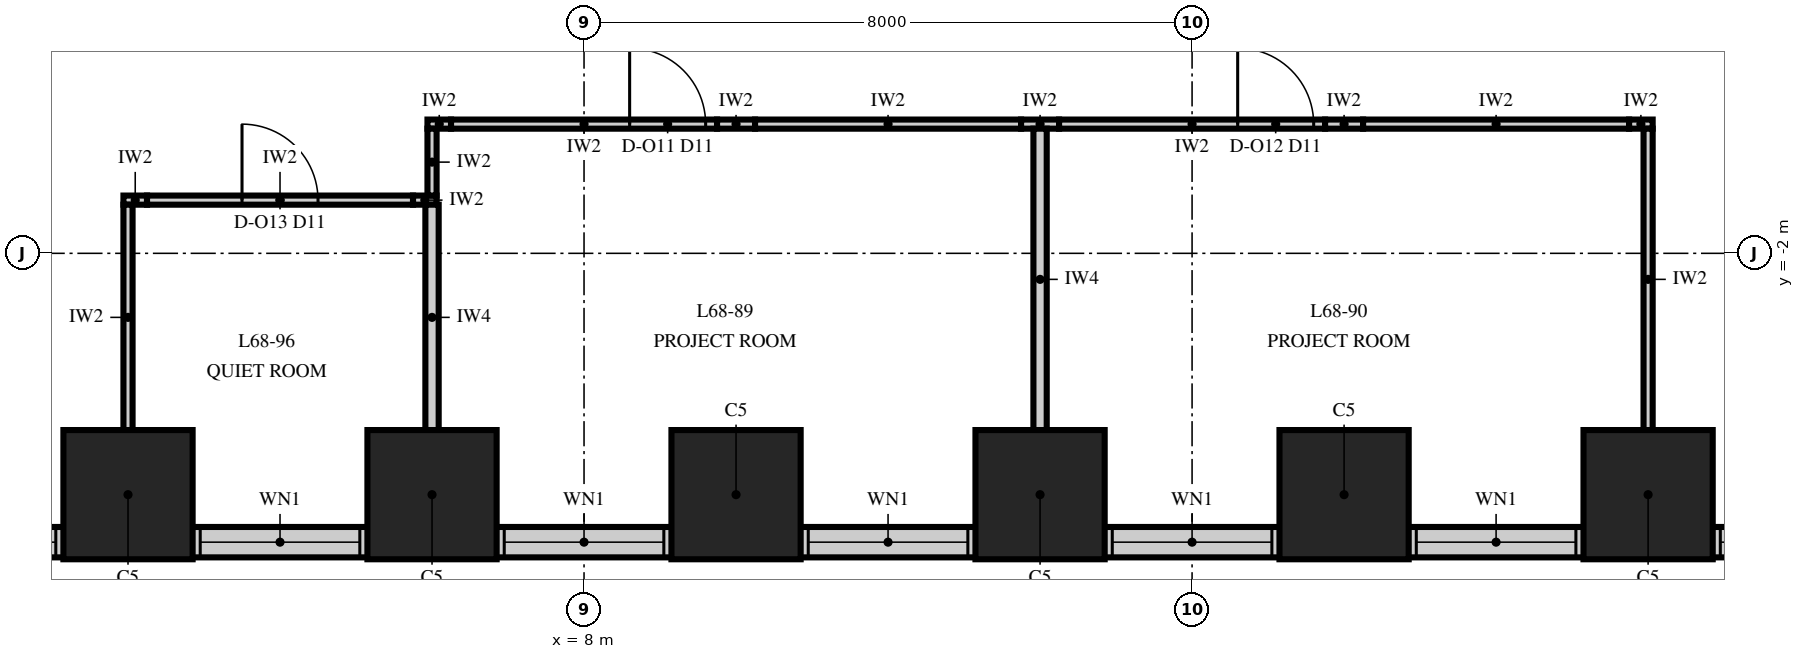
"""IFC4 building model, lengths in metres.
Left out: names, types, materials, properties, quantities, classifications, styles, units other than length and angle.
Written with IfcOpenShell. Run it as: python <this file> out.ifc"""

import sys

from ifc_helpers import new_model, si_unit, direction, frame, frame_2d, origin, origin_2d, place, context, subcontext, project, spatial, rectangle, extrude, element, fill, save


model = new_model("IFC4")
c1 = context("Model", 3, precision=1e-05, world=origin(), true_north=direction((0.0, 1.0)))
c2 = subcontext(c1, "Body", "Model", "MODEL_VIEW")
j1 = project(units=[si_unit("LENGTHUNIT", "METRE"), si_unit("PLANEANGLEUNIT", "RADIAN")], contexts=[c1])
p1 = place(None, origin())
s1 = spatial("IfcSite", under=j1, at=p1, CompositionType="ELEMENT")
p2 = place(p1, origin())
s2 = spatial("IfcBuilding", under=s1, at=p2, CompositionType="ELEMENT")
p3 = place(p2, frame((0.0, 0.0, 292.0)))
s3 = spatial("IfcBuildingStorey", under=s2, at=p3, CompositionType="ELEMENT", Elevation=292.0)
for number, where, z_axis, x_axis in (
    (1, (2.0, -5.175, 0.0), (0.0, 0.0, 1.0), (1.0, 0.0, 0.0)),
    (2, (6.0, -5.175, 0.0), (0.0, 0.0, 1.0), (1.0, 0.0, 0.0)),
    (3, (10.0, -5.175, 0.0), (0.0, 0.0, 1.0), (1.0, 0.0, 0.0)),
    (4, (14.0, -5.175, 0.0), (0.0, 0.0, 1.0), (1.0, 0.0, 0.0)),
    (5, (18.0, -5.175, 0.0), (0.0, 0.0, 1.0), (1.0, 0.0, 0.0)),
    (6, (22.0, -5.175, 0.0), (0.0, 0.0, 1.0), (1.0, 0.0, 0.0)),
):
    element("IfcColumn", number, at=place(p3, frame(where, z_axis=z_axis, x_axis=x_axis)), inside=s3, PredefinedType="COLUMN", context=c2, shape_type="SweptSolid", body=[
        extrude(rectangle(XDim=1.7, YDim=1.7, at=origin_2d()), origin(), (0.0, 0.0, 1.0), 3.75),
    ])
p4 = place(p3, frame((-26.0, -5.8, 0.0), z_axis=(0.0, 0.0, 1.0), x_axis=(1.0, 0.0, 0.0)))
e7 = element("IfcWall", 7, at=p4, inside=s3, PredefinedType="SOLIDWALL", context=c2, shape_type="SweptSolid", body=[
    extrude(rectangle(XDim=52.0, YDim=0.4, at=frame_2d((26.0, 0.0))), origin(), (0.0, 0.0, 1.0), 2.0),
])
p5 = place(p4, frame((0.95, 0.0, 0.8)))
e8 = element("IfcOpeningElement", 8, at=p5, cuts=e7, PredefinedType="OPENING", context=c2, shape_type="SweptSolid", body=[
    extrude(rectangle(XDim=2.1, YDim=1.15, at=frame_2d((1.05, 0.575))), frame((0.0, 0.215, 0.0), z_axis=(0.0, -1.0, 0.0), x_axis=(1.0, 0.0, 0.0)), (0.0, 0.0, 1.0), 0.43),
])
p6 = place(p4, frame((4.95, 0.0, 0.8)))
e9 = element("IfcOpeningElement", 9, at=p6, cuts=e7, PredefinedType="OPENING", context=c2, shape_type="SweptSolid", body=[
    extrude(rectangle(XDim=2.1, YDim=1.15, at=frame_2d((1.05, 0.575))), frame((0.0, 0.215, 0.0), z_axis=(0.0, -1.0, 0.0), x_axis=(1.0, 0.0, 0.0)), (0.0, 0.0, 1.0), 0.43),
])
p7 = place(p4, frame((8.95, 0.0, 0.8)))
e10 = element("IfcOpeningElement", 10, at=p7, cuts=e7, PredefinedType="OPENING", context=c2, shape_type="SweptSolid", body=[
    extrude(rectangle(XDim=2.1, YDim=1.15, at=frame_2d((1.05, 0.575))), frame((0.0, 0.215, 0.0), z_axis=(0.0, -1.0, 0.0), x_axis=(1.0, 0.0, 0.0)), (0.0, 0.0, 1.0), 0.43),
])
p8 = place(p4, frame((12.95, 0.0, 0.8)))
e11 = element("IfcOpeningElement", 11, at=p8, cuts=e7, PredefinedType="OPENING", context=c2, shape_type="SweptSolid", body=[
    extrude(rectangle(XDim=2.1, YDim=1.15, at=frame_2d((1.05, 0.575))), frame((0.0, 0.215, 0.0), z_axis=(0.0, -1.0, 0.0), x_axis=(1.0, 0.0, 0.0)), (0.0, 0.0, 1.0), 0.43),
])
p9 = place(p4, frame((16.95, 0.0, 0.8)))
e12 = element("IfcOpeningElement", 12, at=p9, cuts=e7, PredefinedType="OPENING", context=c2, shape_type="SweptSolid", body=[
    extrude(rectangle(XDim=2.1, YDim=1.15, at=frame_2d((1.05, 0.575))), frame((0.0, 0.215, 0.0), z_axis=(0.0, -1.0, 0.0), x_axis=(1.0, 0.0, 0.0)), (0.0, 0.0, 1.0), 0.43),
])
p10 = place(p4, frame((20.95, 0.0, 0.8)))
e13 = element("IfcOpeningElement", 13, at=p10, cuts=e7, PredefinedType="OPENING", context=c2, shape_type="SweptSolid", body=[
    extrude(rectangle(XDim=2.1, YDim=1.15, at=frame_2d((1.05, 0.575))), frame((0.0, 0.215, 0.0), z_axis=(0.0, -1.0, 0.0), x_axis=(1.0, 0.0, 0.0)), (0.0, 0.0, 1.0), 0.43),
])
p11 = place(p4, frame((24.95, 0.0, 0.8)))
e14 = element("IfcOpeningElement", 14, at=p11, cuts=e7, PredefinedType="OPENING", context=c2, shape_type="SweptSolid", body=[
    extrude(rectangle(XDim=2.1, YDim=1.15, at=frame_2d((1.05, 0.575))), frame((0.0, 0.215, 0.0), z_axis=(0.0, -1.0, 0.0), x_axis=(1.0, 0.0, 0.0)), (0.0, 0.0, 1.0), 0.43),
])
p12 = place(p4, frame((28.95, 0.0, 0.8)))
e15 = element("IfcOpeningElement", 15, at=p12, cuts=e7, PredefinedType="OPENING", context=c2, shape_type="SweptSolid", body=[
    extrude(rectangle(XDim=2.1, YDim=1.15, at=frame_2d((1.05, 0.575))), frame((0.0, 0.215, 0.0), z_axis=(0.0, -1.0, 0.0), x_axis=(1.0, 0.0, 0.0)), (0.0, 0.0, 1.0), 0.43),
])
p13 = place(p4, frame((32.95, 0.0, 0.8)))
e16 = element("IfcOpeningElement", 16, at=p13, cuts=e7, PredefinedType="OPENING", context=c2, shape_type="SweptSolid", body=[
    extrude(rectangle(XDim=2.1, YDim=1.15, at=frame_2d((1.05, 0.575))), frame((0.0, 0.215, 0.0), z_axis=(0.0, -1.0, 0.0), x_axis=(1.0, 0.0, 0.0)), (0.0, 0.0, 1.0), 0.43),
])
p14 = place(p4, frame((36.95, 0.0, 0.8)))
e17 = element("IfcOpeningElement", 17, at=p14, cuts=e7, PredefinedType="OPENING", context=c2, shape_type="SweptSolid", body=[
    extrude(rectangle(XDim=2.1, YDim=1.15, at=frame_2d((1.05, 0.575))), frame((0.0, 0.215, 0.0), z_axis=(0.0, -1.0, 0.0), x_axis=(1.0, 0.0, 0.0)), (0.0, 0.0, 1.0), 0.43),
])
p15 = place(p4, frame((40.95, 0.0, 0.8)))
e18 = element("IfcOpeningElement", 18, at=p15, cuts=e7, PredefinedType="OPENING", context=c2, shape_type="SweptSolid", body=[
    extrude(rectangle(XDim=2.1, YDim=1.15, at=frame_2d((1.05, 0.575))), frame((0.0, 0.215, 0.0), z_axis=(0.0, -1.0, 0.0), x_axis=(1.0, 0.0, 0.0)), (0.0, 0.0, 1.0), 0.43),
])
p16 = place(p4, frame((44.95, 0.0, 0.8)))
e19 = element("IfcOpeningElement", 19, at=p16, cuts=e7, PredefinedType="OPENING", context=c2, shape_type="SweptSolid", body=[
    extrude(rectangle(XDim=2.1, YDim=1.15, at=frame_2d((1.05, 0.575))), frame((0.0, 0.215, 0.0), z_axis=(0.0, -1.0, 0.0), x_axis=(1.0, 0.0, 0.0)), (0.0, 0.0, 1.0), 0.43),
])
p17 = place(p4, frame((48.95, 0.0, 0.8)))
e20 = element("IfcOpeningElement", 20, at=p17, cuts=e7, PredefinedType="OPENING", context=c2, shape_type="SweptSolid", body=[
    extrude(rectangle(XDim=2.1, YDim=1.15, at=frame_2d((1.05, 0.575))), frame((0.0, 0.215, 0.0), z_axis=(0.0, -1.0, 0.0), x_axis=(1.0, 0.0, 0.0)), (0.0, 0.0, 1.0), 0.43),
])
p18 = place(p3, frame((1.94, -1.3, 0.0), z_axis=(0.0, 0.0, 1.0), x_axis=(1.0, 0.0, 0.0)))
e21 = element("IfcWall", 21, at=p18, inside=s3, PredefinedType="PARTITIONING", context=c2, shape_type="SweptSolid", body=[
    extrude(rectangle(XDim=0.31, YDim=0.12, at=frame_2d((0.155, 0.0))), origin(), (0.0, 0.0, 1.0), 2.15),
])
p19 = place(p3, frame((2.25, -1.3, 0.0), z_axis=(0.0, 0.0, 1.0), x_axis=(1.0, 0.0, 0.0)))
e22 = element("IfcWall", 22, at=p19, inside=s3, PredefinedType="PARTITIONING", context=c2, shape_type="SweptSolid", body=[
    extrude(rectangle(XDim=3.5, YDim=0.12, at=frame_2d((1.75, 0.0))), origin(), (0.0, 0.0, 1.0), 3.85),
])
p20 = place(p19, frame((1.25, 0.0, 0.0)))
e23 = element("IfcOpeningElement", 23, at=p20, cuts=e22, PredefinedType="OPENING", context=c2, shape_type="SweptSolid", body=[
    extrude(rectangle(XDim=1.0, YDim=2.4, at=frame_2d((0.5, 1.2))), frame((0.0, 0.075, 0.0), z_axis=(0.0, -1.0, 0.0), x_axis=(1.0, 0.0, 0.0)), (0.0, 0.0, 1.0), 0.15),
])
for number, where, z_axis, x_axis in (
    (24, (5.75, -1.3, 0.0), (0.0, 0.0, 1.0), (1.0, 0.0, 0.0)),
    (25, (5.94, -0.3, 0.0), (0.0, 0.0, 1.0), (1.0, 0.0, 0.0)),
):
    element("IfcWall", number, at=place(p3, frame(where, z_axis=z_axis, x_axis=x_axis)), inside=s3, PredefinedType="PARTITIONING", context=c2, shape_type="SweptSolid", body=[
        extrude(rectangle(XDim=0.31, YDim=0.12, at=frame_2d((0.155, 0.0))), origin(), (0.0, 0.0, 1.0), 2.15),
    ])
p21 = place(p3, frame((6.25, -0.3, 0.0), z_axis=(0.0, 0.0, 1.0), x_axis=(1.0, 0.0, 0.0)))
e26 = element("IfcWall", 26, at=p21, inside=s3, PredefinedType="PARTITIONING", context=c2, shape_type="SweptSolid", body=[
    extrude(rectangle(XDim=3.5, YDim=0.12, at=frame_2d((1.75, 0.0))), origin(), (0.0, 0.0, 1.0), 3.85),
])
p22 = place(p21, frame((2.35, 0.0, 0.0)))
e27 = element("IfcOpeningElement", 27, at=p22, cuts=e26, PredefinedType="OPENING", context=c2, shape_type="SweptSolid", body=[
    extrude(rectangle(XDim=1.0, YDim=2.4, at=frame_2d((0.5, 1.2))), frame((0.0, 0.075, 0.0), z_axis=(0.0, -1.0, 0.0), x_axis=(1.0, 0.0, 0.0)), (0.0, 0.0, 1.0), 0.15),
])
p23 = place(p3, frame((9.75, -0.3, 0.0), z_axis=(0.0, 0.0, 1.0), x_axis=(1.0, 0.0, 0.0)))
e28 = element("IfcWall", 28, at=p23, inside=s3, PredefinedType="PARTITIONING", context=c2, shape_type="SweptSolid", body=[
    extrude(rectangle(XDim=0.5, YDim=0.12, at=frame_2d((0.25, 0.0))), origin(), (0.0, 0.0, 1.0), 2.15),
])
p24 = place(p3, frame((10.25, -0.3, 0.0), z_axis=(0.0, 0.0, 1.0), x_axis=(1.0, 0.0, 0.0)))
e29 = element("IfcWall", 29, at=p24, inside=s3, PredefinedType="PARTITIONING", context=c2, shape_type="SweptSolid", body=[
    extrude(rectangle(XDim=3.5, YDim=0.12, at=frame_2d((1.75, 0.0))), origin(), (0.0, 0.0, 1.0), 3.85),
])
p25 = place(p3, frame((13.75, -0.3, 0.0), z_axis=(0.0, 0.0, 1.0), x_axis=(1.0, 0.0, 0.0)))
e30 = element("IfcWall", 30, at=p25, inside=s3, PredefinedType="PARTITIONING", context=c2, shape_type="SweptSolid", body=[
    extrude(rectangle(XDim=0.5, YDim=0.12, at=frame_2d((0.25, 0.0))), origin(), (0.0, 0.0, 1.0), 2.15),
])
p26 = place(p3, frame((14.25, -0.3, 0.0), z_axis=(0.0, 0.0, 1.0), x_axis=(1.0, 0.0, 0.0)))
e31 = element("IfcWall", 31, at=p26, inside=s3, PredefinedType="PARTITIONING", context=c2, shape_type="SweptSolid", body=[
    extrude(rectangle(XDim=3.5, YDim=0.12, at=frame_2d((1.75, 0.0))), origin(), (0.0, 0.0, 1.0), 3.85),
])
p27 = place(p26, frame((2.35, 0.0, 0.0)))
e32 = element("IfcOpeningElement", 32, at=p27, cuts=e31, PredefinedType="OPENING", context=c2, shape_type="SweptSolid", body=[
    extrude(rectangle(XDim=1.0, YDim=2.4, at=frame_2d((0.5, 1.2))), frame((0.0, 0.075, 0.0), z_axis=(0.0, -1.0, 0.0), x_axis=(1.0, 0.0, 0.0)), (0.0, 0.0, 1.0), 0.15),
])
p28 = place(p3, frame((17.75, -0.3, 0.0), z_axis=(0.0, 0.0, 1.0), x_axis=(1.0, 0.0, 0.0)))
e33 = element("IfcWall", 33, at=p28, inside=s3, PredefinedType="PARTITIONING", context=c2, shape_type="SweptSolid", body=[
    extrude(rectangle(XDim=0.5, YDim=0.12, at=frame_2d((0.25, 0.0))), origin(), (0.0, 0.0, 1.0), 2.15),
])
p29 = place(p3, frame((18.25, -0.3, 0.0), z_axis=(0.0, 0.0, 1.0), x_axis=(1.0, 0.0, 0.0)))
e34 = element("IfcWall", 34, at=p29, inside=s3, PredefinedType="PARTITIONING", context=c2, shape_type="SweptSolid", body=[
    extrude(rectangle(XDim=3.5, YDim=0.12, at=frame_2d((1.75, 0.0))), origin(), (0.0, 0.0, 1.0), 3.85),
])
p30 = place(p3, frame((21.75, -0.3, 0.0), z_axis=(0.0, 0.0, 1.0), x_axis=(1.0, 0.0, 0.0)))
e35 = element("IfcWall", 35, at=p30, inside=s3, PredefinedType="PARTITIONING", context=c2, shape_type="SweptSolid", body=[
    extrude(rectangle(XDim=0.31, YDim=0.12, at=frame_2d((0.155, 0.0))), origin(), (0.0, 0.0, 1.0), 2.15),
])
p31 = place(p3, frame((2.0, -4.325, 0.0), z_axis=(0.0, 0.0, 1.0), x_axis=(0.0, 1.0, 0.0)))
e36 = element("IfcWall", 36, at=p31, inside=s3, PredefinedType="PARTITIONING", context=c2, shape_type="SweptSolid", body=[
    extrude(rectangle(XDim=2.965, YDim=0.12, at=frame_2d((1.482, 0.0))), origin(), (0.0, 0.0, 1.0), 2.15),
])
p32 = place(p3, frame((6.0, -4.325, 0.0), z_axis=(0.0, 0.0, 1.0), x_axis=(0.0, 1.0, 0.0)))
e37 = element("IfcWall", 37, at=p32, inside=s3, PredefinedType="PARTITIONING", context=c2, shape_type="SweptSolid", body=[
    extrude(rectangle(XDim=2.965, YDim=0.175, at=frame_2d((1.482, 0.0))), origin(), (0.0, 0.0, 1.0), 2.15),
])
p33 = place(p3, frame((6.0, -1.24, 0.0), z_axis=(0.0, 0.0, 1.0), x_axis=(0.0, 1.0, 0.0)))
e38 = element("IfcWall", 38, at=p33, inside=s3, PredefinedType="PARTITIONING", context=c2, shape_type="SweptSolid", body=[
    extrude(rectangle(XDim=0.88, YDim=0.12, at=frame_2d((0.44, 0.0))), origin(), (0.0, 0.0, 1.0), 2.15),
])
p34 = place(p3, frame((14.0, -4.325, 0.0), z_axis=(0.0, 0.0, 1.0), x_axis=(0.0, 1.0, 0.0)))
e39 = element("IfcWall", 39, at=p34, inside=s3, PredefinedType="PARTITIONING", context=c2, shape_type="SweptSolid", body=[
    extrude(rectangle(XDim=3.965, YDim=0.175, at=frame_2d((1.982, 0.0))), origin(), (0.0, 0.0, 1.0), 2.15),
])
p35 = place(p3, frame((22.0, -4.325, 0.0), z_axis=(0.0, 0.0, 1.0), x_axis=(0.0, 1.0, 0.0)))
e40 = element("IfcWall", 40, at=p35, inside=s3, PredefinedType="PARTITIONING", context=c2, shape_type="SweptSolid", body=[
    extrude(rectangle(XDim=3.965, YDim=0.12, at=frame_2d((1.982, 0.0))), origin(), (0.0, 0.0, 1.0), 2.15),
])
p36 = place(p11, origin())
e41 = element("IfcWindow", 41, at=p36, inside=s3, PartitioningType="SINGLE_PANEL", PredefinedType="WINDOW", context=c2, shape_type="SweptSolid", body=[
    extrude(rectangle(XDim=2.1, YDim=1.15, at=frame_2d((1.05, 0.575))), frame((0.0, 0.03, 0.0), z_axis=(0.0, -1.0, 0.0), x_axis=(1.0, 0.0, 0.0)), (0.0, 0.0, 1.0), 0.06),
])
fill(e14, e41)
p37 = place(p12, origin())
e42 = element("IfcWindow", 42, at=p37, inside=s3, PartitioningType="SINGLE_PANEL", PredefinedType="WINDOW", context=c2, shape_type="SweptSolid", body=[
    extrude(rectangle(XDim=2.1, YDim=1.15, at=frame_2d((1.05, 0.575))), frame((0.0, 0.03, 0.0), z_axis=(0.0, -1.0, 0.0), x_axis=(1.0, 0.0, 0.0)), (0.0, 0.0, 1.0), 0.06),
])
fill(e15, e42)
p38 = place(p13, origin())
e43 = element("IfcWindow", 43, at=p38, inside=s3, PartitioningType="SINGLE_PANEL", PredefinedType="WINDOW", context=c2, shape_type="SweptSolid", body=[
    extrude(rectangle(XDim=2.1, YDim=1.15, at=frame_2d((1.05, 0.575))), frame((0.0, 0.03, 0.0), z_axis=(0.0, -1.0, 0.0), x_axis=(1.0, 0.0, 0.0)), (0.0, 0.0, 1.0), 0.06),
])
fill(e16, e43)
p39 = place(p14, origin())
e44 = element("IfcWindow", 44, at=p39, inside=s3, PartitioningType="SINGLE_PANEL", PredefinedType="WINDOW", context=c2, shape_type="SweptSolid", body=[
    extrude(rectangle(XDim=2.1, YDim=1.15, at=frame_2d((1.05, 0.575))), frame((0.0, 0.03, 0.0), z_axis=(0.0, -1.0, 0.0), x_axis=(1.0, 0.0, 0.0)), (0.0, 0.0, 1.0), 0.06),
])
fill(e17, e44)
p40 = place(p15, origin())
e45 = element("IfcWindow", 45, at=p40, inside=s3, PartitioningType="SINGLE_PANEL", PredefinedType="WINDOW", context=c2, shape_type="SweptSolid", body=[
    extrude(rectangle(XDim=2.1, YDim=1.15, at=frame_2d((1.05, 0.575))), frame((0.0, 0.03, 0.0), z_axis=(0.0, -1.0, 0.0), x_axis=(1.0, 0.0, 0.0)), (0.0, 0.0, 1.0), 0.06),
])
fill(e18, e45)
p41 = place(p16, origin())
e46 = element("IfcWindow", 46, at=p41, inside=s3, PartitioningType="SINGLE_PANEL", PredefinedType="WINDOW", context=c2, shape_type="SweptSolid", body=[
    extrude(rectangle(XDim=2.1, YDim=1.15, at=frame_2d((1.05, 0.575))), frame((0.0, 0.03, 0.0), z_axis=(0.0, -1.0, 0.0), x_axis=(1.0, 0.0, 0.0)), (0.0, 0.0, 1.0), 0.06),
])
fill(e19, e46)
p42 = place(p17, origin())
e47 = element("IfcWindow", 47, at=p42, inside=s3, PartitioningType="SINGLE_PANEL", PredefinedType="WINDOW", context=c2, shape_type="SweptSolid", body=[
    extrude(rectangle(XDim=2.1, YDim=1.15, at=frame_2d((1.05, 0.575))), frame((0.0, 0.03, 0.0), z_axis=(0.0, -1.0, 0.0), x_axis=(1.0, 0.0, 0.0)), (0.0, 0.0, 1.0), 0.06),
])
fill(e20, e47)
p43 = place(p22, origin())
e48 = element("IfcDoor", 48, at=p43, inside=s3, OperationType="SINGLE_SWING_RIGHT", PredefinedType="DOOR", context=c2, shape_type="SweptSolid", body=[
    extrude(rectangle(XDim=1.0, YDim=2.4, at=frame_2d((0.5, 1.2))), frame((0.0, 0.06, 0.0), z_axis=(0.0, -1.0, 0.0), x_axis=(1.0, 0.0, 0.0)), (0.0, 0.0, 1.0), 0.12),
])
fill(e27, e48)
p44 = place(p27, origin())
e49 = element("IfcDoor", 49, at=p44, inside=s3, OperationType="SINGLE_SWING_RIGHT", PredefinedType="DOOR", context=c2, shape_type="SweptSolid", body=[
    extrude(rectangle(XDim=1.0, YDim=2.4, at=frame_2d((0.5, 1.2))), frame((0.0, 0.06, 0.0), z_axis=(0.0, -1.0, 0.0), x_axis=(1.0, 0.0, 0.0)), (0.0, 0.0, 1.0), 0.12),
])
fill(e32, e49)
p45 = place(p20, origin())
e50 = element("IfcDoor", 50, at=p45, inside=s3, OperationType="SINGLE_SWING_RIGHT", PredefinedType="DOOR", context=c2, shape_type="SweptSolid", body=[
    extrude(rectangle(XDim=1.0, YDim=2.4, at=frame_2d((0.5, 1.2))), frame((0.0, 0.06, 0.0), z_axis=(0.0, -1.0, 0.0), x_axis=(1.0, 0.0, 0.0)), (0.0, 0.0, 1.0), 0.12),
])
fill(e23, e50)
save(model, sys.argv[1])
